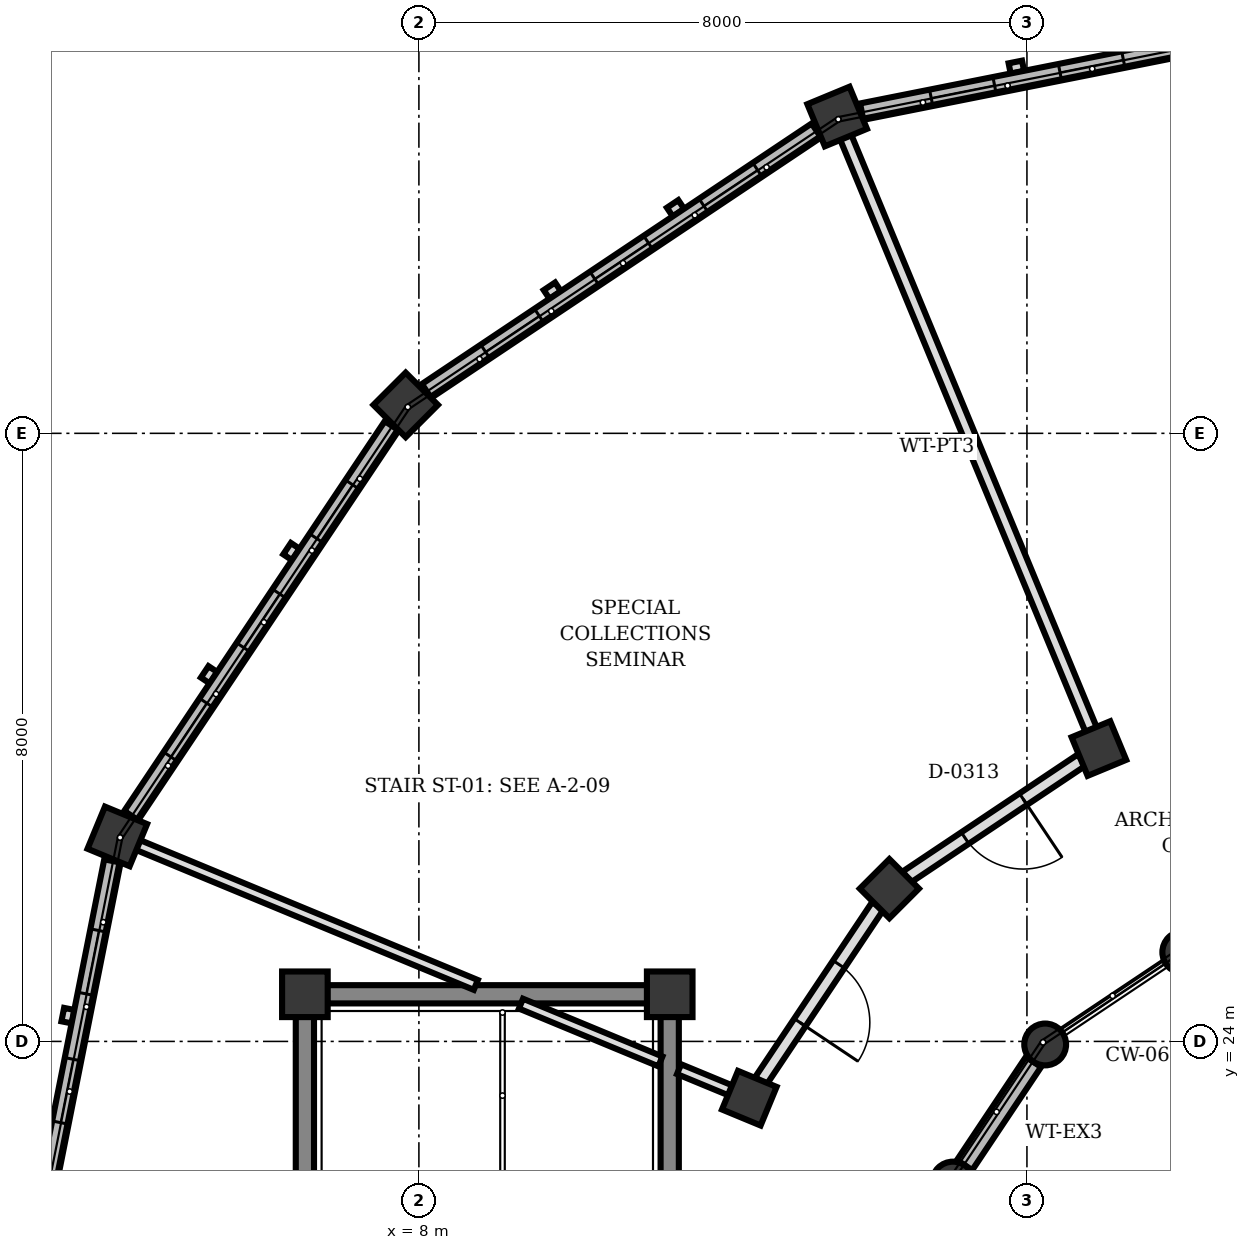
"""IFC4 building model, lengths in metres.
Left out: names, types, materials, properties, quantities, classifications, styles, units other than length and angle.
Written with IfcOpenShell. Run it as: python <this file> out.ifc"""

import sys

from ifc_helpers import new_model, si_unit, direction, frame, frame_2d, origin, origin_2d, place, context, subcontext, project, spatial, rectangle, circle, extrude, element, fill, save


model = new_model("IFC4")
c1 = context("Model", 3, precision=1e-05, world=origin(), true_north=direction((0.0, 1.0)))
c2 = subcontext(c1, "Body", "Model", "MODEL_VIEW")
j1 = project(units=[si_unit("LENGTHUNIT", "METRE"), si_unit("PLANEANGLEUNIT", "RADIAN")], contexts=[c1])
p1 = place(None, origin())
s1 = spatial("IfcSite", under=j1, at=p1, CompositionType="ELEMENT")
p2 = place(p1, origin())
s2 = spatial("IfcBuilding", under=s1, at=p2, CompositionType="ELEMENT")
p3 = place(p2, frame((0.0, 0.0, 12.5)))
s3 = spatial("IfcBuildingStorey", under=s2, at=p3, CompositionType="ELEMENT", Elevation=12.5)
for number, where, z_axis, x_axis in (
    (1, (11.3, 24.62, 0.0), (0.0, 0.0, 1.0), (1.0, 0.0, 0.0)),
    (2, (6.5, 24.62, 0.0), (0.0, 0.0, 1.0), (1.0, 0.0, 0.0)),
):
    element("IfcColumn", number, at=place(p3, frame(where, z_axis=z_axis, x_axis=x_axis)), inside=s3, PredefinedType="COLUMN", context=c2, shape_type="SweptSolid", body=[
        extrude(rectangle(XDim=0.6, YDim=0.6, at=origin_2d()), origin(), (0.0, 0.0, 1.0), 4.0),
    ])
for number, where, z_axis, x_axis in (
    (3, (18.057, 25.174, 0.0), (0.0, 0.0, 1.0), (1.0, 0.0, 0.0)),
    (4, (16.24, 23.96, 0.0), (0.0, 0.0, 1.0), (1.0, 0.0, 0.0)),
    (5, (15.026, 22.143, 0.0), (0.0, 0.0, 1.0), (1.0, 0.0, 0.0)),
):
    element("IfcColumn", number, at=place(p3, frame(where, z_axis=z_axis, x_axis=x_axis)), inside=s3, PredefinedType="COLUMN", context=c2, shape_type="SweptSolid", body=[
        extrude(circle(Radius=0.275, at=origin_2d()), origin(), (0.0, 0.0, 1.0), 3.865),
    ])
for number, where, z_axis, x_axis in (
    (6, (16.947, 27.853, 0.0), (0.0, 0.0, 1.0), (-0.383, 0.924, 0.0)),
    (7, (14.19, 26.01, 0.0), (0.0, 0.0, 1.0), (-0.707, 0.707, 0.0)),
    (8, (12.347, 23.253, 0.0), (0.0, 0.0, 1.0), (-0.924, 0.383, 0.0)),
):
    element("IfcColumn", number, at=place(p3, frame(where, z_axis=z_axis, x_axis=x_axis)), inside=s3, PredefinedType="COLUMN", context=c2, shape_type="SweptSolid", body=[
        extrude(rectangle(XDim=0.55, YDim=0.55, at=origin_2d()), origin(), (0.0, 0.0, 1.0), 4.59),
    ])
for number, where, z_axis, x_axis in (
    (9, (13.503, 36.168, 0.0), (0.0, 0.0, 1.0), (-0.383, 0.924, 0.0)),
    (10, (7.826, 32.374, 0.0), (0.0, 0.0, 1.0), (-0.707, 0.707, 0.0)),
    (11, (4.032, 26.697, 0.0), (0.0, 0.0, 1.0), (-0.924, 0.383, 0.0)),
):
    element("IfcColumn", number, at=place(p3, frame(where, z_axis=z_axis, x_axis=x_axis)), inside=s3, PredefinedType="COLUMN", context=c2, shape_type="SweptSolid", body=[
        extrude(rectangle(XDim=0.6, YDim=0.6, at=origin_2d()), origin(), (0.0, 0.0, 1.0), 6.84),
    ])
p4 = place(p3, frame((13.826, 36.232, 0.0), z_axis=(0.0, 0.0, 1.0), x_axis=(0.980770460131, 0.195164813773, 0.0)))
e12 = element("IfcWall", 12, at=p4, inside=s3, PredefinedType="SOLIDWALL", context=c2, shape_type="SweptSolid", body=[
    extrude(rectangle(XDim=6.17, YDim=0.22, at=frame_2d((3.085, 0.0))), origin(), (0.0, 0.0, 1.0), 6.35),
])
p5 = place(p4, frame((0.932, 0.0, 0.85)))
e13 = element("IfcOpeningElement", 13, at=p5, cuts=e12, PredefinedType="OPENING", context=c2, shape_type="SweptSolid", body=[
    extrude(rectangle(XDim=0.85, YDim=1.25, at=frame_2d((0.425, 0.625))), frame((0.0, 0.12, 0.0), z_axis=(0.0, -1.0, 0.0), x_axis=(1.0, 0.0, 0.0)), (0.0, 0.0, 1.0), 0.24),
])
p6 = place(p4, frame((2.66, 0.0, 0.85)))
e14 = element("IfcOpeningElement", 14, at=p6, cuts=e12, PredefinedType="OPENING", context=c2, shape_type="SweptSolid", body=[
    extrude(rectangle(XDim=0.85, YDim=1.25, at=frame_2d((0.425, 0.625))), frame((0.0, 0.12, 0.0), z_axis=(0.0, -1.0, 0.0), x_axis=(1.0, 0.0, 0.0)), (0.0, 0.0, 1.0), 0.24),
])
p7 = place(p4, frame((4.387, 0.0, 0.85)))
e15 = element("IfcOpeningElement", 15, at=p7, cuts=e12, PredefinedType="OPENING", context=c2, shape_type="SweptSolid", body=[
    extrude(rectangle(XDim=0.85, YDim=1.25, at=frame_2d((0.425, 0.625))), frame((0.0, 0.12, 0.0), z_axis=(0.0, -1.0, 0.0), x_axis=(1.0, 0.0, 0.0)), (0.0, 0.0, 1.0), 0.24),
])
p8 = place(p3, frame((8.1, 32.557, 0.0), z_axis=(0.0, 0.0, 1.0), x_axis=(0.831379966495, 0.555704374025, 0.0)))
e16 = element("IfcWall", 16, at=p8, inside=s3, PredefinedType="SOLIDWALL", context=c2, shape_type="SweptSolid", body=[
    extrude(rectangle(XDim=6.169, YDim=0.22, at=frame_2d((3.084, 0.0))), origin(), (0.0, 0.0, 1.0), 6.35),
])
p9 = place(p8, frame((0.932, 0.0, 0.85)))
e17 = element("IfcOpeningElement", 17, at=p9, cuts=e16, PredefinedType="OPENING", context=c2, shape_type="SweptSolid", body=[
    extrude(rectangle(XDim=0.85, YDim=1.25, at=frame_2d((0.425, 0.625))), frame((0.0, 0.12, 0.0), z_axis=(0.0, -1.0, 0.0), x_axis=(1.0, 0.0, 0.0)), (0.0, 0.0, 1.0), 0.24),
])
p10 = place(p8, frame((2.66, 0.0, 0.85)))
e18 = element("IfcOpeningElement", 18, at=p10, cuts=e16, PredefinedType="OPENING", context=c2, shape_type="SweptSolid", body=[
    extrude(rectangle(XDim=0.85, YDim=1.25, at=frame_2d((0.425, 0.625))), frame((0.0, 0.12, 0.0), z_axis=(0.0, -1.0, 0.0), x_axis=(1.0, 0.0, 0.0)), (0.0, 0.0, 1.0), 0.24),
])
p11 = place(p8, frame((4.387, 0.0, 0.85)))
e19 = element("IfcOpeningElement", 19, at=p11, cuts=e16, PredefinedType="OPENING", context=c2, shape_type="SweptSolid", body=[
    extrude(rectangle(XDim=0.85, YDim=1.25, at=frame_2d((0.425, 0.625))), frame((0.0, 0.12, 0.0), z_axis=(0.0, -1.0, 0.0), x_axis=(1.0, 0.0, 0.0)), (0.0, 0.0, 1.0), 0.24),
])
p12 = place(p3, frame((4.215, 26.971, 0.0), z_axis=(0.0, 0.0, 1.0), x_axis=(0.555658736667, 0.831410469242, 0.0)))
e20 = element("IfcWall", 20, at=p12, inside=s3, PredefinedType="SOLIDWALL", context=c2, shape_type="SweptSolid", body=[
    extrude(rectangle(XDim=6.169, YDim=0.22, at=frame_2d((3.084, 0.0))), origin(), (0.0, 0.0, 1.0), 6.35),
])
p13 = place(p12, frame((0.932, 0.0, 0.85)))
e21 = element("IfcOpeningElement", 21, at=p13, cuts=e20, PredefinedType="OPENING", context=c2, shape_type="SweptSolid", body=[
    extrude(rectangle(XDim=0.85, YDim=1.25, at=frame_2d((0.425, 0.625))), frame((0.0, 0.12, 0.0), z_axis=(0.0, -1.0, 0.0), x_axis=(1.0, 0.0, 0.0)), (0.0, 0.0, 1.0), 0.24),
])
p14 = place(p12, frame((2.66, 0.0, 0.85)))
e22 = element("IfcOpeningElement", 22, at=p14, cuts=e20, PredefinedType="OPENING", context=c2, shape_type="SweptSolid", body=[
    extrude(rectangle(XDim=0.85, YDim=1.25, at=frame_2d((0.425, 0.625))), frame((0.0, 0.12, 0.0), z_axis=(0.0, -1.0, 0.0), x_axis=(1.0, 0.0, 0.0)), (0.0, 0.0, 1.0), 0.24),
])
p15 = place(p12, frame((4.387, 0.0, 0.85)))
e23 = element("IfcOpeningElement", 23, at=p15, cuts=e20, PredefinedType="OPENING", context=c2, shape_type="SweptSolid", body=[
    extrude(rectangle(XDim=0.85, YDim=1.25, at=frame_2d((0.425, 0.625))), frame((0.0, 0.12, 0.0), z_axis=(0.0, -1.0, 0.0), x_axis=(1.0, 0.0, 0.0)), (0.0, 0.0, 1.0), 0.24),
])
p16 = place(p3, frame((16.086, 23.73, 0.0), z_axis=(0.0, 0.0, 1.0), x_axis=(-0.555287078904, -0.83165874011, 0.0)))
e24 = element("IfcWall", 24, at=p16, inside=s3, PredefinedType="SOLIDWALL", context=c2, shape_type="SweptSolid", body=[
    extrude(rectangle(XDim=1.632, YDim=0.24, at=frame_2d((0.816, 0.0))), origin(), (0.0, 0.0, 1.0), 3.375),
])
p17 = place(p3, frame((2.764, 20.323, 0.0), z_axis=(0.0, 0.0, 1.0), x_axis=(0.195164813773, 0.980770460131, 0.0)))
e25 = element("IfcWall", 25, at=p17, inside=s3, PredefinedType="SOLIDWALL", context=c2, shape_type="SweptSolid", body=[
    extrude(rectangle(XDim=6.17, YDim=0.22, at=frame_2d((3.085, 0.0))), origin(), (0.0, 0.0, 1.0), 6.35),
])
p18 = place(p17, frame((0.932, 0.0, 0.85)))
e26 = element("IfcOpeningElement", 26, at=p18, cuts=e25, PredefinedType="OPENING", context=c2, shape_type="SweptSolid", body=[
    extrude(rectangle(XDim=0.85, YDim=1.25, at=frame_2d((0.425, 0.625))), frame((0.0, 0.12, 0.0), z_axis=(0.0, -1.0, 0.0), x_axis=(1.0, 0.0, 0.0)), (0.0, 0.0, 1.0), 0.24),
])
p19 = place(p17, frame((2.66, 0.0, 0.85)))
e27 = element("IfcOpeningElement", 27, at=p19, cuts=e25, PredefinedType="OPENING", context=c2, shape_type="SweptSolid", body=[
    extrude(rectangle(XDim=0.85, YDim=1.25, at=frame_2d((0.425, 0.625))), frame((0.0, 0.12, 0.0), z_axis=(0.0, -1.0, 0.0), x_axis=(1.0, 0.0, 0.0)), (0.0, 0.0, 1.0), 0.24),
])
p20 = place(p17, frame((4.387, 0.0, 0.85)))
e28 = element("IfcOpeningElement", 28, at=p20, cuts=e25, PredefinedType="OPENING", context=c2, shape_type="SweptSolid", body=[
    extrude(rectangle(XDim=0.85, YDim=1.25, at=frame_2d((0.425, 0.625))), frame((0.0, 0.12, 0.0), z_axis=(0.0, -1.0, 0.0), x_axis=(1.0, 0.0, 0.0)), (0.0, 0.0, 1.0), 0.24),
])
p21 = place(p3, frame((6.5, 16.192, 0.0), z_axis=(0.0, 0.0, 1.0), x_axis=(0.0, 1.0, 0.0)))
e29 = element("IfcWall", 29, at=p21, inside=s3, PredefinedType="SHEAR", context=c2, shape_type="SweptSolid", body=[
    extrude(rectangle(XDim=8.136, YDim=0.24, at=frame_2d((4.068, 0.0))), origin(), (0.0, 0.0, 1.0), 3.74),
])
p22 = place(p3, frame((11.3, 24.328, 0.0), z_axis=(0.0, 0.0, 1.0), x_axis=(0.0, -1.0, 0.0)))
e30 = element("IfcWall", 30, at=p22, inside=s3, PredefinedType="SHEAR", context=c2, shape_type="SweptSolid", body=[
    extrude(rectangle(XDim=8.136, YDim=0.24, at=frame_2d((4.068, 0.0))), origin(), (0.0, 0.0, 1.0), 3.74),
])
p23 = place(p22, frame((6.244, 0.0, 0.0)))
e31 = element("IfcOpeningElement", 31, at=p23, cuts=e30, PredefinedType="OPENING", context=c2, shape_type="SweptSolid", body=[
    extrude(rectangle(XDim=0.88, YDim=2.1, at=frame_2d((0.44, 1.05))), frame((0.0, 0.13, 0.0), z_axis=(0.0, -1.0, 0.0), x_axis=(1.0, 0.0, 0.0)), (0.0, 0.0, 1.0), 0.26),
])
p24 = place(p3, frame((11.008, 24.62, 0.0), z_axis=(0.0, 0.0, 1.0), x_axis=(-1.0, 0.0, 0.0)))
e32 = element("IfcWall", 32, at=p24, inside=s3, PredefinedType="SHEAR", context=c2, shape_type="SweptSolid", body=[
    extrude(rectangle(XDim=4.216, YDim=0.24, at=frame_2d((2.108, 0.0))), origin(), (0.0, 0.0, 1.0), 3.74),
])
p25 = place(p3, frame((16.845, 28.1, 0.0), z_axis=(0.0, 0.0, 1.0), x_axis=(-0.382683896966, 0.923879340067, 0.0)))
e33 = element("IfcWall", 33, at=p25, inside=s3, PredefinedType="PARTITIONING", context=c2, shape_type="SweptSolid", body=[
    extrude(rectangle(XDim=8.44, YDim=0.16, at=frame_2d((4.22, 0.0))), origin(), (0.0, 0.0, 1.0), 3.7),
])
p26 = place(p3, frame((12.1, 23.355, 0.0), z_axis=(0.0, 0.0, 1.0), x_axis=(-0.924069600435, 0.382224245113, 0.0)))
e34 = element("IfcWall", 34, at=p26, inside=s3, PredefinedType="PARTITIONING", context=c2, shape_type="SweptSolid", body=[
    extrude(rectangle(XDim=0.733, YDim=0.14, at=frame_2d((0.366, 0.0))), origin(), (0.0, 0.0, 1.0), 3.7),
])
p27 = place(p3, frame((11.177, 23.737, 0.0), z_axis=(0.0, 0.0, 1.0), x_axis=(-0.923817443679, 0.382833293686, 0.0)))
e35 = element("IfcWall", 35, at=p27, inside=s3, PredefinedType="PARTITIONING", context=c2, shape_type="SweptSolid", body=[
    extrude(rectangle(XDim=1.985, YDim=0.14, at=frame_2d((0.993, 0.0))), origin(), (0.0, 0.0, 1.0), 3.7),
])
p28 = place(p3, frame((8.749, 24.743, 0.0), z_axis=(0.0, 0.0, 1.0), x_axis=(-0.923877739946, 0.382687759972, 0.0)))
e36 = element("IfcWall", 36, at=p28, inside=s3, PredefinedType="PARTITIONING", context=c2, shape_type="SweptSolid", body=[
    extrude(rectangle(XDim=4.813, YDim=0.14, at=frame_2d((2.407, 0.0))), origin(), (0.0, 0.0, 1.0), 3.7),
])
p29 = place(p3, frame((16.721, 27.702, 0.0), z_axis=(0.0, 0.0, 1.0), x_axis=(-0.831318045056, -0.555797002478, 0.0)))
e37 = element("IfcWall", 37, at=p29, inside=s3, PredefinedType="PARTITIONING", context=c2, shape_type="SweptSolid", body=[
    extrude(rectangle(XDim=2.773, YDim=0.18, at=frame_2d((1.386, 0.0))), origin(), (0.0, 0.0, 1.0), 3.7),
])
p30 = place(p29, frame((0.926, 0.0, 0.0)))
e38 = element("IfcOpeningElement", 38, at=p30, cuts=e37, PredefinedType="OPENING", context=c2, shape_type="SweptSolid", body=[
    extrude(rectangle(XDim=0.92, YDim=2.1, at=frame_2d((0.46, 1.05))), frame((0.0, 0.1, 0.0), z_axis=(0.0, -1.0, 0.0), x_axis=(1.0, 0.0, 0.0)), (0.0, 0.0, 1.0), 0.2),
])
p31 = place(p3, frame((14.039, 25.784, 0.0), z_axis=(0.0, 0.0, 1.0), x_axis=(-0.555797002478, -0.831318045056, 0.0)))
e39 = element("IfcWall", 39, at=p31, inside=s3, PredefinedType="PARTITIONING", context=c2, shape_type="SweptSolid", body=[
    extrude(rectangle(XDim=2.773, YDim=0.18, at=frame_2d((1.386, 0.0))), origin(), (0.0, 0.0, 1.0), 3.7),
])
p32 = place(p31, frame((0.926, 0.0, 0.0)))
e40 = element("IfcOpeningElement", 40, at=p32, cuts=e39, PredefinedType="OPENING", context=c2, shape_type="SweptSolid", body=[
    extrude(rectangle(XDim=0.92, YDim=2.1, at=frame_2d((0.46, 1.05))), frame((0.0, 0.1, 0.0), z_axis=(0.0, -1.0, 0.0), x_axis=(1.0, 0.0, 0.0)), (0.0, 0.0, 1.0), 0.2),
])
p33 = place(p5, origin())
e41 = element("IfcWindow", 41, at=p33, inside=s3, PartitioningType="SINGLE_PANEL", PredefinedType="WINDOW", context=c2, shape_type="SweptSolid", body=[
    extrude(rectangle(XDim=0.85, YDim=1.25, at=frame_2d((0.425, 0.625))), frame((0.0, 0.03, 0.0), z_axis=(0.0, -1.0, 0.0), x_axis=(1.0, 0.0, 0.0)), (0.0, 0.0, 1.0), 0.06),
])
fill(e13, e41)
p34 = place(p6, origin())
e42 = element("IfcWindow", 42, at=p34, inside=s3, PartitioningType="SINGLE_PANEL", PredefinedType="WINDOW", context=c2, shape_type="SweptSolid", body=[
    extrude(rectangle(XDim=0.85, YDim=1.25, at=frame_2d((0.425, 0.625))), frame((0.0, 0.03, 0.0), z_axis=(0.0, -1.0, 0.0), x_axis=(1.0, 0.0, 0.0)), (0.0, 0.0, 1.0), 0.06),
])
fill(e14, e42)
p35 = place(p9, origin())
e43 = element("IfcWindow", 43, at=p35, inside=s3, PartitioningType="SINGLE_PANEL", PredefinedType="WINDOW", context=c2, shape_type="SweptSolid", body=[
    extrude(rectangle(XDim=0.85, YDim=1.25, at=frame_2d((0.425, 0.625))), frame((0.0, 0.03, 0.0), z_axis=(0.0, -1.0, 0.0), x_axis=(1.0, 0.0, 0.0)), (0.0, 0.0, 1.0), 0.06),
])
fill(e17, e43)
p36 = place(p10, origin())
e44 = element("IfcWindow", 44, at=p36, inside=s3, PartitioningType="SINGLE_PANEL", PredefinedType="WINDOW", context=c2, shape_type="SweptSolid", body=[
    extrude(rectangle(XDim=0.85, YDim=1.25, at=frame_2d((0.425, 0.625))), frame((0.0, 0.03, 0.0), z_axis=(0.0, -1.0, 0.0), x_axis=(1.0, 0.0, 0.0)), (0.0, 0.0, 1.0), 0.06),
])
fill(e18, e44)
p37 = place(p11, origin())
e45 = element("IfcWindow", 45, at=p37, inside=s3, PartitioningType="SINGLE_PANEL", PredefinedType="WINDOW", context=c2, shape_type="SweptSolid", body=[
    extrude(rectangle(XDim=0.85, YDim=1.25, at=frame_2d((0.425, 0.625))), frame((0.0, 0.03, 0.0), z_axis=(0.0, -1.0, 0.0), x_axis=(1.0, 0.0, 0.0)), (0.0, 0.0, 1.0), 0.06),
])
fill(e19, e45)
p38 = place(p13, origin())
e46 = element("IfcWindow", 46, at=p38, inside=s3, PartitioningType="SINGLE_PANEL", PredefinedType="WINDOW", context=c2, shape_type="SweptSolid", body=[
    extrude(rectangle(XDim=0.85, YDim=1.25, at=frame_2d((0.425, 0.625))), frame((0.0, 0.03, 0.0), z_axis=(0.0, -1.0, 0.0), x_axis=(1.0, 0.0, 0.0)), (0.0, 0.0, 1.0), 0.06),
])
fill(e21, e46)
p39 = place(p14, origin())
e47 = element("IfcWindow", 47, at=p39, inside=s3, PartitioningType="SINGLE_PANEL", PredefinedType="WINDOW", context=c2, shape_type="SweptSolid", body=[
    extrude(rectangle(XDim=0.85, YDim=1.25, at=frame_2d((0.425, 0.625))), frame((0.0, 0.03, 0.0), z_axis=(0.0, -1.0, 0.0), x_axis=(1.0, 0.0, 0.0)), (0.0, 0.0, 1.0), 0.06),
])
fill(e22, e47)
p40 = place(p15, origin())
e48 = element("IfcWindow", 48, at=p40, inside=s3, PartitioningType="SINGLE_PANEL", PredefinedType="WINDOW", context=c2, shape_type="SweptSolid", body=[
    extrude(rectangle(XDim=0.85, YDim=1.25, at=frame_2d((0.425, 0.625))), frame((0.0, 0.03, 0.0), z_axis=(0.0, -1.0, 0.0), x_axis=(1.0, 0.0, 0.0)), (0.0, 0.0, 1.0), 0.06),
])
fill(e23, e48)
p41 = place(p19, origin())
e49 = element("IfcWindow", 49, at=p41, inside=s3, PartitioningType="SINGLE_PANEL", PredefinedType="WINDOW", context=c2, shape_type="SweptSolid", body=[
    extrude(rectangle(XDim=0.85, YDim=1.25, at=frame_2d((0.425, 0.625))), frame((0.0, 0.03, 0.0), z_axis=(0.0, -1.0, 0.0), x_axis=(1.0, 0.0, 0.0)), (0.0, 0.0, 1.0), 0.06),
])
fill(e27, e49)
p42 = place(p20, origin())
e50 = element("IfcWindow", 50, at=p42, inside=s3, PartitioningType="SINGLE_PANEL", PredefinedType="WINDOW", context=c2, shape_type="SweptSolid", body=[
    extrude(rectangle(XDim=0.85, YDim=1.25, at=frame_2d((0.425, 0.625))), frame((0.0, 0.03, 0.0), z_axis=(0.0, -1.0, 0.0), x_axis=(1.0, 0.0, 0.0)), (0.0, 0.0, 1.0), 0.06),
])
fill(e28, e50)
p43 = place(p30, origin())
e51 = element("IfcDoor", 51, at=p43, inside=s3, OperationType="SINGLE_SWING_LEFT", PredefinedType="DOOR", context=c2, shape_type="SweptSolid", body=[
    extrude(rectangle(XDim=0.92, YDim=2.1, at=frame_2d((0.46, 1.05))), frame((0.0, 0.025, 0.0), z_axis=(0.0, -1.0, 0.0), x_axis=(1.0, 0.0, 0.0)), (0.0, 0.0, 1.0), 0.05),
])
fill(e38, e51)
p44 = place(p32, origin())
e52 = element("IfcDoor", 52, at=p44, inside=s3, OperationType="SINGLE_SWING_RIGHT", PredefinedType="DOOR", context=c2, shape_type="SweptSolid", body=[
    extrude(rectangle(XDim=0.92, YDim=2.1, at=frame_2d((0.46, 1.05))), frame((0.0, 0.025, 0.0), z_axis=(0.0, -1.0, 0.0), x_axis=(1.0, 0.0, 0.0)), (0.0, 0.0, 1.0), 0.05),
])
fill(e40, e52)
save(model, sys.argv[1])
